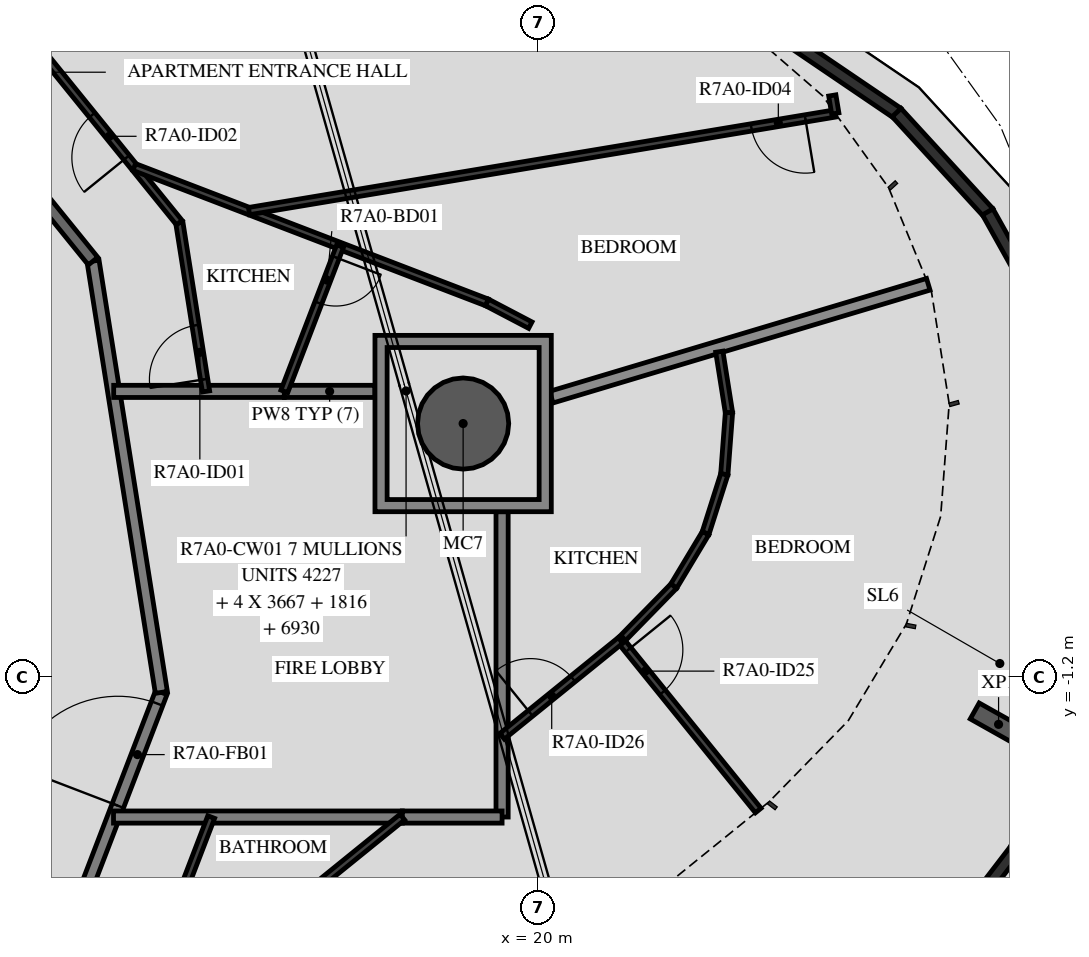
"""IFC4 building model, lengths in metres.
Left out: names, types, materials, properties, quantities, classifications, styles, units other than length and angle.
Written with IfcOpenShell. Run it as: python <this file> out.ifc"""

import sys

from ifc_helpers import new_model, si_unit, direction, frame, frame_2d, origin, origin_2d, place, context, subcontext, project, spatial, polyline, rectangle, hollow_circle, i_section, outline, extrude, element, fill, save


model = new_model("IFC4")
c1 = context("Model", 3, precision=1e-05, world=origin(), true_north=direction((0.0, 1.0)))
c2 = subcontext(c1, "Body", "Model", "MODEL_VIEW")
j1 = project(units=[si_unit("LENGTHUNIT", "METRE"), si_unit("PLANEANGLEUNIT", "RADIAN")], contexts=[c1])
p1 = place(None, origin())
s1 = spatial("IfcSite", under=j1, at=p1, CompositionType="ELEMENT")
p2 = place(p1, origin())
s2 = spatial("IfcBuilding", under=s1, at=p2, CompositionType="ELEMENT")
p3 = place(p2, frame((0.0, 0.0, 263.4)))
s3 = spatial("IfcBuildingStorey", under=s2, at=p3, CompositionType="ELEMENT", Elevation=263.4)
p4 = place(p3, frame((18.76, 2.971, -0.45), z_axis=(0.0, 0.0, 1.0), x_axis=(1.0, 0.0, 0.0)))
e1 = element("IfcColumn", 1, at=p4, inside=s3, PredefinedType="COLUMN", context=c2, shape_type="SweptSolid", body=[
    extrude(hollow_circle(Radius=0.75, WallThickness=0.035, at=origin_2d()), origin(), (0.0, 0.0, 1.0), 3.57),
])
p5 = place(p3, frame((27.565, -1.976, -0.45), z_axis=(0.0, 0.0, 1.0), x_axis=(-0.489802299008, -0.871833532211, 0.0)))
e2 = element("IfcColumn", 2, at=p5, inside=s3, PredefinedType="COLUMN", context=c2, shape_type="SweptSolid", body=[
    extrude(i_section(OverallWidth=0.3, OverallDepth=0.9, WebThickness=0.019, FlangeThickness=0.035, FilletRadius=0.03, at=origin_2d()), origin(), (0.0, 0.0, 1.0), 3.57),
])
p6 = place(p3, frame((24.029, 9.345, 0.03), z_axis=(0.0, 0.0, 1.0), x_axis=(0.827412960447, -0.561593975114, 0.0)))
e3 = element("IfcWall", 3, at=p6, inside=s3, PredefinedType="PARAPET", context=c2, shape_type="SweptSolid", body=[
    extrude(rectangle(XDim=2.258, YDim=0.2, at=frame_2d((1.129, 0.0))), origin(), (0.0, 0.0, 1.0), 1.5),
])
p7 = place(p3, frame((25.888, 8.085, 0.03), z_axis=(0.0, 0.0, 1.0), x_axis=(0.675590656091, -0.737276925858, 0.0)))
e4 = element("IfcWall", 4, at=p7, inside=s3, PredefinedType="PARAPET", context=c2, shape_type="SweptSolid", body=[
    extrude(rectangle(XDim=2.228, YDim=0.2, at=frame_2d((1.114, 0.0))), origin(), (0.0, 0.0, 1.0), 1.5),
])
p8 = place(p3, frame((27.386, 6.452, 0.03), z_axis=(0.0, 0.0, 1.0), x_axis=(0.48738170277, -0.873189026388, 0.0)))
e5 = element("IfcWall", 5, at=p8, inside=s3, PredefinedType="PARAPET", context=c2, shape_type="SweptSolid", body=[
    extrude(rectangle(XDim=2.228, YDim=0.2, at=frame_2d((1.114, 0.0))), origin(), (0.0, 0.0, 1.0), 1.5),
])
p9 = place(p3, frame((27.851, -4.03, 0.03), z_axis=(0.0, 0.0, 1.0), x_axis=(-0.608746621461, -0.793364702303, 0.0)))
e6 = element("IfcWall", 6, at=p9, inside=s3, PredefinedType="PARAPET", context=c2, shape_type="SweptSolid", body=[
    extrude(rectangle(XDim=2.228, YDim=0.2, at=frame_2d((1.114, 0.0))), origin(), (0.0, 0.0, 1.0), 1.5),
])
p10 = place(p3, frame((11.223, -8.154, 0.0), z_axis=(0.0, 0.0, 1.0), x_axis=(0.358341090983, 0.93359073609, 0.0)))
e7 = element("IfcWall", 7, at=p10, inside=s3, PredefinedType="STANDARD", context=c2, shape_type="SweptSolid", body=[
    extrude(rectangle(XDim=7.181, YDim=0.2, at=frame_2d((3.59, 0.0))), origin(), (0.0, 0.0, 1.0), 3.12),
])
p11 = place(p10, frame((5.185, 0.0, 0.0)))
e8 = element("IfcOpeningElement", 8, at=p11, cuts=e7, PredefinedType="OPENING", context=c2, shape_type="SweptSolid", body=[
    extrude(rectangle(XDim=1.8, YDim=2.1, at=frame_2d((0.9, 1.05))), frame((0.0, 0.11, 0.0), z_axis=(0.0, -1.0, 0.0), x_axis=(1.0, 0.0, 0.0)), (0.0, 0.0, 1.0), 0.22),
])
p12 = place(p3, frame((13.797, -1.45, 0.0), z_axis=(0.0, 0.0, 1.0), x_axis=(-0.156421704315, 0.987690361611, 0.0)))
e9 = element("IfcWall", 9, at=p12, inside=s3, PredefinedType="STANDARD", context=c2, shape_type="SweptSolid", body=[
    extrude(rectangle(XDim=7.181, YDim=0.2, at=frame_2d((3.591, 0.0))), origin(), (0.0, 0.0, 1.0), 3.12),
])
p13 = place(p3, frame((12.673, 5.643, 0.0), z_axis=(0.0, 0.0, 1.0), x_axis=(-0.629302871585, 0.777160148113, 0.0)))
e10 = element("IfcWall", 10, at=p13, inside=s3, PredefinedType="STANDARD", context=c2, shape_type="SweptSolid", body=[
    extrude(rectangle(XDim=7.181, YDim=0.2, at=frame_2d((3.59, 0.0))), origin(), (0.0, 0.0, 1.0), 3.12),
])
p14 = place(p13, frame((4.1, 0.0, 0.0)))
e11 = element("IfcOpeningElement", 11, at=p14, cuts=e10, PredefinedType="OPENING", context=c2, shape_type="SweptSolid", body=[
    extrude(rectangle(XDim=1.0, YDim=2.1, at=frame_2d((0.5, 1.05))), frame((0.0, 0.11, 0.0), z_axis=(0.0, -1.0, 0.0), x_axis=(1.0, 0.0, 0.0)), (0.0, 0.0, 1.0), 0.22),
])
p15 = place(p3, frame((15.819, 3.5, 0.0), z_axis=(0.0, 0.0, 1.0), x_axis=(-1.0, 0.0, 0.0)))
e12 = element("IfcWall", 12, at=p15, inside=s3, PredefinedType="STANDARD", context=c2, shape_type="SweptSolid", body=[
    extrude(rectangle(XDim=2.806, YDim=0.2, at=frame_2d((1.403, 0.0))), origin(), (0.0, 0.0, 1.0), 3.12),
])
p16 = place(p3, frame((17.309, 3.5, 0.0), z_axis=(0.0, 0.0, 1.0), x_axis=(-1.0, 0.0, 0.0)))
e13 = element("IfcWall", 13, at=p16, inside=s3, PredefinedType="STANDARD", context=c2, shape_type="SweptSolid", body=[
    extrude(rectangle(XDim=1.49, YDim=0.2, at=frame_2d((0.745, 0.0))), origin(), (0.0, 0.0, 1.0), 3.12),
])
p17 = place(p3, frame((13.01, -3.5, 0.0), z_axis=(0.0, 0.0, 1.0), x_axis=(1.0, 0.0, 0.0)))
e14 = element("IfcWall", 14, at=p17, inside=s3, PredefinedType="STANDARD", context=c2, shape_type="SweptSolid", body=[
    extrude(rectangle(XDim=4.75, YDim=0.2, at=frame_2d((2.375, 0.0))), origin(), (0.0, 0.0, 1.0), 3.12),
])
p18 = place(p3, frame((19.4, -3.5, 0.0), z_axis=(0.0, 0.0, 1.0), x_axis=(0.0, 1.0, 0.0)))
e15 = element("IfcWall", 15, at=p18, inside=s3, PredefinedType="STANDARD", context=c2, shape_type="SweptSolid", body=[
    extrude(rectangle(XDim=5.021, YDim=0.2, at=frame_2d((2.511, 0.0))), origin(), (0.0, 0.0, 1.0), 3.12),
])
p19 = place(p3, frame((17.76, -3.5, 0.0), z_axis=(0.0, 0.0, 1.0), x_axis=(1.0, 0.0, 0.0)))
e16 = element("IfcWall", 16, at=p19, inside=s3, PredefinedType="STANDARD", context=c2, shape_type="SweptSolid", body=[
    extrude(rectangle(XDim=1.64, YDim=0.2, at=frame_2d((0.82, 0.0))), origin(), (0.0, 0.0, 1.0), 3.12),
])
p20 = place(p3, frame((20.209, 3.405, 0.0), z_axis=(0.0, 0.0, 1.0), x_axis=(0.957991224208, 0.286797514529, 0.0)))
e17 = element("IfcWall", 17, at=p20, inside=s3, PredefinedType="STANDARD", context=c2, shape_type="SweptSolid", body=[
    extrude(rectangle(XDim=6.471, YDim=0.2, at=frame_2d((3.236, 0.0))), origin(), (0.0, 0.0, 1.0), 2.73),
])
p21 = place(p3, frame((14.531, 3.5, 0.0), z_axis=(0.0, 0.0, 1.0), x_axis=(-0.1564580042, 0.987684612071, 0.0)))
e18 = element("IfcWall", 18, at=p21, inside=s3, PredefinedType="PARTITIONING", context=c2, shape_type="SweptSolid", body=[
    extrude(rectangle(XDim=2.809, YDim=0.12, at=frame_2d((1.404, 0.0))), origin(), (0.0, 0.0, 1.0), 3.12),
])
p22 = place(p21, frame((0.2, 0.0, 0.0)))
e19 = element("IfcOpeningElement", 19, at=p22, cuts=e18, PredefinedType="OPENING", context=c2, shape_type="SweptSolid", body=[
    extrude(rectangle(XDim=0.9, YDim=2.1, at=frame_2d((0.45, 1.05))), frame((0.0, 0.07, 0.0), z_axis=(0.0, -1.0, 0.0), x_axis=(1.0, 0.0, 0.0)), (0.0, 0.0, 1.0), 0.14),
])
p23 = place(p3, frame((14.092, 6.274, 0.0), z_axis=(0.0, 0.0, 1.0), x_axis=(-0.62933367237, 0.777135206268, 0.0)))
e20 = element("IfcWall", 20, at=p23, inside=s3, PredefinedType="PARTITIONING", context=c2, shape_type="SweptSolid", body=[
    extrude(rectangle(XDim=7.985, YDim=0.12, at=frame_2d((3.992, 0.0))), origin(), (0.0, 0.0, 1.0), 3.12),
])
p24 = place(p23, frame((1.378, 0.0, 0.0)))
e21 = element("IfcOpeningElement", 21, at=p24, cuts=e20, PredefinedType="OPENING", context=c2, shape_type="SweptSolid", body=[
    extrude(rectangle(XDim=0.9, YDim=2.1, at=frame_2d((0.45, 1.05))), frame((0.0, 0.07, 0.0), z_axis=(0.0, -1.0, 0.0), x_axis=(1.0, 0.0, 0.0)), (0.0, 0.0, 1.0), 0.14),
])
p25 = place(p23, frame((4.749, 0.0, 0.0)))
e22 = element("IfcOpeningElement", 22, at=p25, cuts=e20, PredefinedType="OPENING", context=c2, shape_type="SweptSolid", body=[
    extrude(rectangle(XDim=0.9, YDim=2.1, at=frame_2d((0.45, 1.05))), frame((0.0, 0.07, 0.0), z_axis=(0.0, -1.0, 0.0), x_axis=(1.0, 0.0, 0.0)), (0.0, 0.0, 1.0), 0.14),
])
p26 = place(p3, frame((19.865, 4.589, 0.0), z_axis=(0.0, 0.0, 1.0), x_axis=(-0.885855229108, 0.46396175819, 0.0)))
e23 = element("IfcWall", 23, at=p26, inside=s3, PredefinedType="PARTITIONING", context=c2, shape_type="SweptSolid", body=[
    extrude(rectangle(XDim=0.807, YDim=0.12, at=frame_2d((0.403, 0.0))), origin(), (0.0, 0.0, 1.0), 3.12),
])
p27 = place(p3, frame((19.15, 4.963, 0.0), z_axis=(0.0, 0.0, 1.0), x_axis=(-0.933571304602, 0.358391711992, 0.0)))
e24 = element("IfcWall", 24, at=p27, inside=s3, PredefinedType="PARTITIONING", context=c2, shape_type="SweptSolid", body=[
    extrude(rectangle(XDim=6.212, YDim=0.12, at=frame_2d((3.106, 0.0))), origin(), (0.0, 0.0, 1.0), 3.12),
])
p28 = place(p3, frame((16.737, 5.89, 0.0), z_axis=(0.0, 0.0, 1.0), x_axis=(-0.358397454141, -0.933569100209, 0.0)))
e25 = element("IfcWall", 25, at=p28, inside=s3, PredefinedType="PARTITIONING", context=c2, shape_type="SweptSolid", body=[
    extrude(rectangle(XDim=2.56, YDim=0.12, at=frame_2d((1.28, 0.0))), origin(), (0.0, 0.0, 1.0), 3.12),
])
p29 = place(p28, frame((0.2, 0.0, 0.0)))
e26 = element("IfcOpeningElement", 26, at=p29, cuts=e25, PredefinedType="OPENING", context=c2, shape_type="SweptSolid", body=[
    extrude(rectangle(XDim=0.8, YDim=2.1, at=frame_2d((0.4, 1.05))), frame((0.0, 0.07, 0.0), z_axis=(0.0, -1.0, 0.0), x_axis=(1.0, 0.0, 0.0)), (0.0, 0.0, 1.0), 0.14),
])
p30 = place(p3, frame((24.88, 8.071, 0.0), z_axis=(0.0, 0.0, 1.0), x_axis=(-0.986414168431, -0.164277473558, 0.0)))
e27 = element("IfcWall", 27, at=p30, inside=s3, PredefinedType="PARTITIONING", context=c2, shape_type="SweptSolid", body=[
    extrude(rectangle(XDim=9.774, YDim=0.12, at=frame_2d((4.887, 0.0))), origin(), (0.0, 0.0, 1.0), 3.12),
])
p31 = place(p30, frame((0.5, 0.0, 0.0)))
e28 = element("IfcOpeningElement", 28, at=p31, cuts=e27, PredefinedType="OPENING", context=c2, shape_type="SweptSolid", body=[
    extrude(rectangle(XDim=0.9, YDim=2.1, at=frame_2d((0.45, 1.05))), frame((0.0, 0.07, 0.0), z_axis=(0.0, -1.0, 0.0), x_axis=(1.0, 0.0, 0.0)), (0.0, 0.0, 1.0), 0.14),
])
p32 = place(p3, frame((12.505, -9.001, 0.0), z_axis=(0.0, 0.0, 1.0), x_axis=(0.358373707046, 0.933578216379, 0.0)))
e29 = element("IfcWall", 29, at=p32, inside=s3, PredefinedType="PARTITIONING", context=c2, shape_type="SweptSolid", body=[
    extrude(rectangle(XDim=5.892, YDim=0.12, at=frame_2d((2.946, 0.0))), origin(), (0.0, 0.0, 1.0), 3.12),
])
p33 = place(p32, frame((0.2, 0.0, 0.0)))
e30 = element("IfcOpeningElement", 30, at=p33, cuts=e29, PredefinedType="OPENING", context=c2, shape_type="SweptSolid", body=[
    extrude(rectangle(XDim=0.9, YDim=2.1, at=frame_2d((0.45, 1.05))), frame((0.0, 0.07, 0.0), z_axis=(0.0, -1.0, 0.0), x_axis=(1.0, 0.0, 0.0)), (0.0, 0.0, 1.0), 0.14),
])
p34 = place(p32, frame((3.436, 0.0, 0.0)))
e31 = element("IfcOpeningElement", 31, at=p34, cuts=e29, PredefinedType="OPENING", context=c2, shape_type="SweptSolid", body=[
    extrude(rectangle(XDim=0.8, YDim=2.1, at=frame_2d((0.4, 1.05))), frame((0.0, 0.07, 0.0), z_axis=(0.0, -1.0, 0.0), x_axis=(1.0, 0.0, 0.0)), (0.0, 0.0, 1.0), 0.14),
])
p35 = place(p3, frame((22.972, 4.153, 0.0), z_axis=(0.0, 0.0, 1.0), x_axis=(0.156209385929, -0.987723963336, 0.0)))
e32 = element("IfcWall", 32, at=p35, inside=s3, PredefinedType="PARTITIONING", context=c2, shape_type="SweptSolid", body=[
    extrude(rectangle(XDim=1.016, YDim=0.12, at=frame_2d((0.508, 0.0))), origin(), (0.0, 0.0, 1.0), 3.12),
])
p36 = place(p3, frame((23.131, 3.149, 0.0), z_axis=(0.0, 0.0, 1.0), x_axis=(-0.075446997935, -0.99714981347, 0.0)))
e33 = element("IfcWall", 33, at=p36, inside=s3, PredefinedType="PARTITIONING", context=c2, shape_type="SweptSolid", body=[
    extrude(rectangle(XDim=1.016, YDim=0.12, at=frame_2d((0.508, 0.0))), origin(), (0.0, 0.0, 1.0), 3.12),
])
p37 = place(p3, frame((23.054, 2.136, 0.0), z_axis=(0.0, 0.0, 1.0), x_axis=(-0.303511129679, -0.952827893253, 0.0)))
e34 = element("IfcWall", 34, at=p37, inside=s3, PredefinedType="PARTITIONING", context=c2, shape_type="SweptSolid", body=[
    extrude(rectangle(XDim=1.016, YDim=0.12, at=frame_2d((0.508, 0.0))), origin(), (0.0, 0.0, 1.0), 3.12),
])
p38 = place(p3, frame((22.746, 1.168, 0.0), z_axis=(0.0, 0.0, 1.0), x_axis=(-0.515096534995, -0.857132171626, 0.0)))
e35 = element("IfcWall", 35, at=p38, inside=s3, PredefinedType="PARTITIONING", context=c2, shape_type="SweptSolid", body=[
    extrude(rectangle(XDim=1.016, YDim=0.12, at=frame_2d((0.508, 0.0))), origin(), (0.0, 0.0, 1.0), 3.12),
])
p39 = place(p3, frame((22.223, 0.298, 0.0), z_axis=(0.0, 0.0, 1.0), x_axis=(-0.69880109182, -0.715316037896, 0.0)))
e36 = element("IfcWall", 36, at=p39, inside=s3, PredefinedType="PARTITIONING", context=c2, shape_type="SweptSolid", body=[
    extrude(rectangle(XDim=1.227, YDim=0.12, at=frame_2d((0.614, 0.0))), origin(), (0.0, 0.0, 1.0), 3.12),
])
p40 = place(p3, frame((21.347, -0.595, 0.0), z_axis=(0.0, 0.0, 1.0), x_axis=(0.62934843781, -0.7771232488, 0.0)))
e37 = element("IfcWall", 37, at=p40, inside=s3, PredefinedType="PARTITIONING", context=c2, shape_type="SweptSolid", body=[
    extrude(rectangle(XDim=3.6, YDim=0.12, at=frame_2d((1.8, 0.0))), origin(), (0.0, 0.0, 1.0), 3.12),
])
p41 = place(p40, frame((0.2, 0.0, 0.0)))
e38 = element("IfcOpeningElement", 38, at=p41, cuts=e37, PredefinedType="OPENING", context=c2, shape_type="SweptSolid", body=[
    extrude(rectangle(XDim=0.9, YDim=2.1, at=frame_2d((0.45, 1.05))), frame((0.0, 0.07, 0.0), z_axis=(0.0, -1.0, 0.0), x_axis=(1.0, 0.0, 0.0)), (0.0, 0.0, 1.0), 0.14),
])
p42 = place(p3, frame((19.4, -2.172, 0.0), z_axis=(0.0, 0.0, 1.0), x_axis=(0.777147279935, 0.629318762862, 0.0)))
e39 = element("IfcWall", 39, at=p42, inside=s3, PredefinedType="PARTITIONING", context=c2, shape_type="SweptSolid", body=[
    extrude(rectangle(XDim=2.505, YDim=0.12, at=frame_2d((1.253, 0.0))), origin(), (0.0, 0.0, 1.0), 3.12),
])
p43 = place(p42, frame((0.6, 0.0, 0.0)))
e40 = element("IfcOpeningElement", 40, at=p43, cuts=e39, PredefinedType="OPENING", context=c2, shape_type="SweptSolid", body=[
    extrude(rectangle(XDim=0.9, YDim=2.1, at=frame_2d((0.45, 1.05))), frame((0.0, 0.07, 0.0), z_axis=(0.0, -1.0, 0.0), x_axis=(1.0, 0.0, 0.0)), (0.0, 0.0, 1.0), 0.14),
])
p44 = place(p3, frame((17.76, -3.5, 0.0), z_axis=(0.0, 0.0, 1.0), x_axis=(-0.777133455716, -0.62933583404, 0.0)))
e41 = element("IfcWall", 41, at=p44, inside=s3, PredefinedType="PARTITIONING", context=c2, shape_type="SweptSolid", body=[
    extrude(rectangle(XDim=5.869, YDim=0.12, at=frame_2d((2.935, 0.0))), origin(), (0.0, 0.0, 1.0), 3.12),
])
p45 = place(p3, frame((24.88, 8.071, 0.0), z_axis=(0.0, 0.0, 1.0), x_axis=(-0.164398987305, 0.986393923832, 0.0)))
e42 = element("IfcWall", 42, at=p45, inside=s3, PredefinedType="PARTITIONING", context=c2, shape_type="SweptSolid", body=[
    extrude(rectangle(XDim=0.3, YDim=0.12, at=frame_2d((0.15, 0.0))), origin(), (0.0, 0.0, 1.0), 3.12),
])
p46 = place(p3, origin())
e43 = element("IfcWall", 43, at=p46, inside=s3, PredefinedType="STANDARD", context=c2, shape_type="SweptSolid", body=[
    extrude(outline(polyline([(20.209, 4.421), (20.209, 1.521), (17.309, 1.521), (17.309, 4.421), (20.209, 4.421)]), holes=[polyline([(17.51, 1.721), (20.01, 1.721), (20.01, 4.221), (17.51, 4.221), (17.51, 1.721)])]), origin(), (0.0, 0.0, 1.0), 3.12),
])
p47 = place(p22, origin())
e44 = element("IfcDoor", 44, at=p47, inside=s3, OperationType="SINGLE_SWING_LEFT", PredefinedType="DOOR", context=c2, shape_type="SweptSolid", body=[
    extrude(rectangle(XDim=0.9, YDim=2.1, at=frame_2d((0.45, 1.05))), frame((0.0, 0.025, 0.0), z_axis=(0.0, -1.0, 0.0), x_axis=(1.0, 0.0, 0.0)), (0.0, 0.0, 1.0), 0.05),
])
fill(e19, e44)
p48 = place(p24, origin())
e45 = element("IfcDoor", 45, at=p48, inside=s3, OperationType="SINGLE_SWING_LEFT", PredefinedType="DOOR", context=c2, shape_type="SweptSolid", body=[
    extrude(rectangle(XDim=0.9, YDim=2.1, at=frame_2d((0.45, 1.05))), frame((0.0, 0.025, 0.0), z_axis=(0.0, -1.0, 0.0), x_axis=(1.0, 0.0, 0.0)), (0.0, 0.0, 1.0), 0.05),
])
fill(e21, e45)
p49 = place(p29, origin())
e46 = element("IfcDoor", 46, at=p49, inside=s3, OperationType="SINGLE_SWING_LEFT", PredefinedType="DOOR", context=c2, shape_type="SweptSolid", body=[
    extrude(rectangle(XDim=0.8, YDim=2.1, at=frame_2d((0.4, 1.05))), frame((0.0, 0.025, 0.0), z_axis=(0.0, -1.0, 0.0), x_axis=(1.0, 0.0, 0.0)), (0.0, 0.0, 1.0), 0.05),
])
fill(e26, e46)
p50 = place(p31, origin())
e47 = element("IfcDoor", 47, at=p50, inside=s3, OperationType="SINGLE_SWING_LEFT", PredefinedType="DOOR", context=c2, shape_type="SweptSolid", body=[
    extrude(rectangle(XDim=0.9, YDim=2.1, at=frame_2d((0.45, 1.05))), frame((0.0, 0.025, 0.0), z_axis=(0.0, -1.0, 0.0), x_axis=(1.0, 0.0, 0.0)), (0.0, 0.0, 1.0), 0.05),
])
fill(e28, e47)
p51 = place(p41, origin())
e48 = element("IfcDoor", 48, at=p51, inside=s3, OperationType="SINGLE_SWING_RIGHT", PredefinedType="DOOR", context=c2, shape_type="SweptSolid", body=[
    extrude(rectangle(XDim=0.9, YDim=2.1, at=frame_2d((0.45, 1.05))), frame((0.0, 0.025, 0.0), z_axis=(0.0, -1.0, 0.0), x_axis=(1.0, 0.0, 0.0)), (0.0, 0.0, 1.0), 0.05),
])
fill(e38, e48)
p52 = place(p43, origin())
e49 = element("IfcDoor", 49, at=p52, inside=s3, OperationType="SINGLE_SWING_LEFT", PredefinedType="DOOR", context=c2, shape_type="SweptSolid", body=[
    extrude(rectangle(XDim=0.9, YDim=2.1, at=frame_2d((0.45, 1.05))), frame((0.0, 0.025, 0.0), z_axis=(0.0, -1.0, 0.0), x_axis=(1.0, 0.0, 0.0)), (0.0, 0.0, 1.0), 0.05),
])
fill(e40, e49)
p53 = place(p11, origin())
e50 = element("IfcDoor", 50, at=p53, inside=s3, OperationType="DOUBLE_DOOR_SINGLE_SWING", PredefinedType="DOOR", context=c2, shape_type="SweptSolid", body=[
    extrude(rectangle(XDim=1.8, YDim=2.1, at=frame_2d((0.9, 1.05))), frame((0.0, 0.025, 0.0), z_axis=(0.0, -1.0, 0.0), x_axis=(1.0, 0.0, 0.0)), (0.0, 0.0, 1.0), 0.05),
])
fill(e8, e50)
save(model, sys.argv[1])
